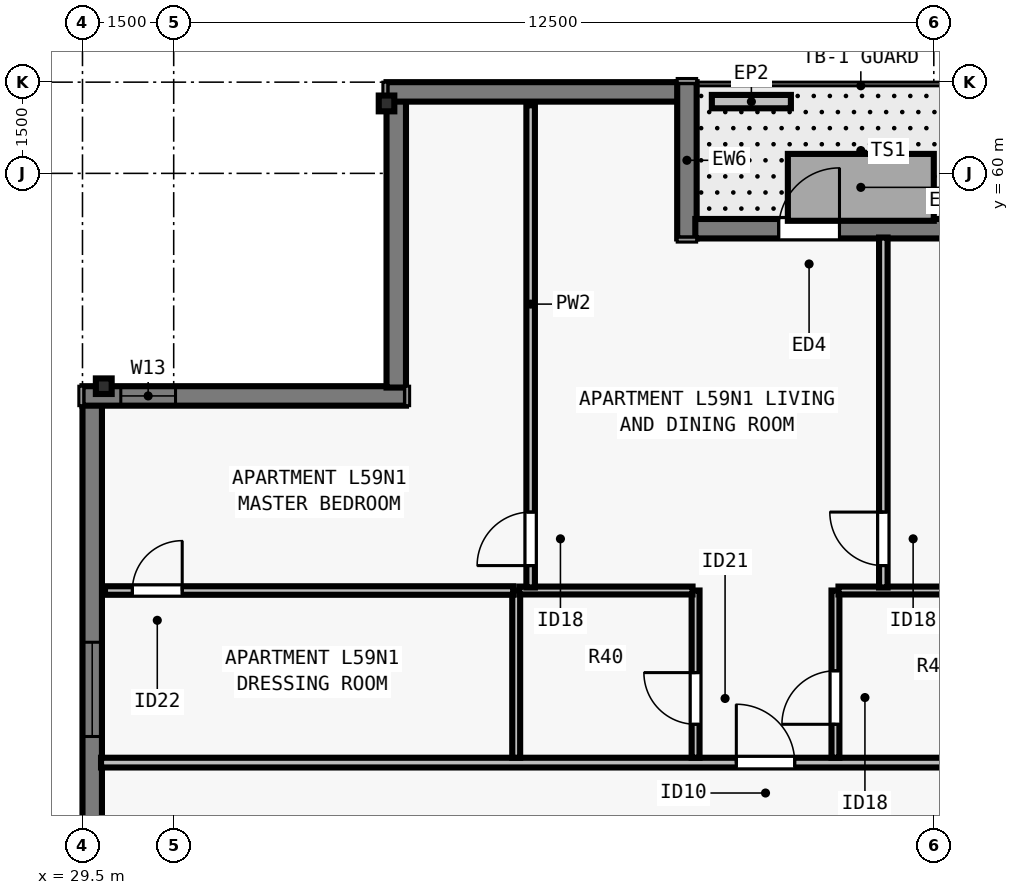
"""IFC4 building model, lengths in metres.
Left out: names, types, materials, properties, quantities, classifications, styles, units other than length and angle.
Written with IfcOpenShell. Run it as: python <this file> out.ifc"""

import sys

from ifc_helpers import new_model, si_unit, direction, frame, frame_2d, origin, origin_2d, place, context, subcontext, project, spatial, rectangle, i_section, extrude, element, fill, save


model = new_model("IFC4")
c1 = context("Model", 3, precision=1e-05, world=origin(), true_north=direction((0.0, 1.0)))
c2 = subcontext(c1, "Body", "Model", "MODEL_VIEW")
j1 = project(units=[si_unit("LENGTHUNIT", "METRE"), si_unit("PLANEANGLEUNIT", "RADIAN")], contexts=[c1])
p1 = place(None, origin())
s1 = spatial("IfcSite", under=j1, at=p1, CompositionType="ELEMENT")
p2 = place(p1, origin())
s2 = spatial("IfcBuilding", under=s1, at=p2, CompositionType="ELEMENT")
p3 = place(p2, frame((0.0, 0.0, 216.5)))
s3 = spatial("IfcBuildingStorey", under=s2, at=p3, CompositionType="ELEMENT", Elevation=216.5)
for number, where, z_axis, x_axis in (
    (1, (34.5, 61.15, 0.0), (0.0, 0.0, 1.0), (1.0, 0.0, 0.0)),
    (2, (29.85, 56.5, 0.0), (0.0, 0.0, 1.0), (0.0, 1.0, 0.0)),
):
    element("IfcColumn", number, at=place(p3, frame(where, z_axis=z_axis, x_axis=x_axis)), inside=s3, PredefinedType="COLUMN", context=c2, shape_type="SweptSolid", body=[
        extrude(i_section(OverallWidth=0.256, OverallDepth=0.26, WebThickness=0.01, FlangeThickness=0.017, FilletRadius=0.013, at=origin_2d()), origin(), (0.0, 0.0, 1.0), 3.5),
    ])
p4 = place(p3, frame((29.66, 21.5, 0.0), z_axis=(0.0, 0.0, 1.0), x_axis=(0.0, 1.0, 0.0)))
e3 = element("IfcWall", 3, at=p4, inside=s3, PredefinedType="SOLIDWALL", context=c2, shape_type="SweptSolid", body=[
    extrude(rectangle(XDim=34.702, YDim=0.32, at=frame_2d((17.351, 0.0))), origin(), (0.0, 0.0, 1.0), 3.29),
])
p5 = place(p4, frame((6.888, 0.0, 0.8)))
e4 = element("IfcOpeningElement", 4, at=p5, cuts=e3, PredefinedType="OPENING", context=c2, shape_type="SweptSolid", body=[
    extrude(rectangle(XDim=1.55, YDim=1.678, at=frame_2d((0.775, 0.839))), frame((0.0, 0.17, 0.0), z_axis=(0.0, -1.0, 0.0), x_axis=(1.0, 0.0, 0.0)), (0.0, 0.0, 1.0), 0.34),
])
p6 = place(p4, frame((10.113, 0.0, 0.8)))
e5 = element("IfcOpeningElement", 5, at=p6, cuts=e3, PredefinedType="OPENING", context=c2, shape_type="SweptSolid", body=[
    extrude(rectangle(XDim=1.85, YDim=1.678, at=frame_2d((0.925, 0.839))), frame((0.0, 0.17, 0.0), z_axis=(0.0, -1.0, 0.0), x_axis=(1.0, 0.0, 0.0)), (0.0, 0.0, 1.0), 0.34),
])
p7 = place(p4, frame((14.888, 0.0, 0.8)))
e6 = element("IfcOpeningElement", 6, at=p7, cuts=e3, PredefinedType="OPENING", context=c2, shape_type="SweptSolid", body=[
    extrude(rectangle(XDim=1.55, YDim=1.678, at=frame_2d((0.775, 0.839))), frame((0.0, 0.17, 0.0), z_axis=(0.0, -1.0, 0.0), x_axis=(1.0, 0.0, 0.0)), (0.0, 0.0, 1.0), 0.34),
])
p8 = place(p4, frame((18.114, 0.0, 0.8)))
e7 = element("IfcOpeningElement", 7, at=p8, cuts=e3, PredefinedType="OPENING", context=c2, shape_type="SweptSolid", body=[
    extrude(rectangle(XDim=1.85, YDim=1.678, at=frame_2d((0.925, 0.839))), frame((0.0, 0.17, 0.0), z_axis=(0.0, -1.0, 0.0), x_axis=(1.0, 0.0, 0.0)), (0.0, 0.0, 1.0), 0.34),
])
p9 = place(p4, frame((23.614, 0.0, 0.8)))
e8 = element("IfcOpeningElement", 8, at=p9, cuts=e3, PredefinedType="OPENING", context=c2, shape_type="SweptSolid", body=[
    extrude(rectangle(XDim=1.85, YDim=1.678, at=frame_2d((0.925, 0.839))), frame((0.0, 0.17, 0.0), z_axis=(0.0, -1.0, 0.0), x_axis=(1.0, 0.0, 0.0)), (0.0, 0.0, 1.0), 0.34),
])
p10 = place(p4, frame((29.24, 0.0, 0.8)))
e9 = element("IfcOpeningElement", 9, at=p10, cuts=e3, PredefinedType="OPENING", context=c2, shape_type="SweptSolid", body=[
    extrude(rectangle(XDim=1.55, YDim=1.678, at=frame_2d((0.775, 0.839))), frame((0.0, 0.17, 0.0), z_axis=(0.0, -1.0, 0.0), x_axis=(1.0, 0.0, 0.0)), (0.0, 0.0, 1.0), 0.34),
])
p11 = place(p3, frame((29.5, 56.34, 0.0), z_axis=(0.0, 0.0, 1.0), x_axis=(1.0, 0.0, 0.0)))
e10 = element("IfcWall", 10, at=p11, inside=s3, PredefinedType="SOLIDWALL", context=c2, shape_type="SweptSolid", body=[
    extrude(rectangle(XDim=5.32, YDim=0.32, at=frame_2d((2.66, 0.0))), origin(), (0.0, 0.0, 1.0), 3.29),
])
p12 = place(p11, frame((0.63, 0.0, 0.8)))
e11 = element("IfcOpeningElement", 11, at=p12, cuts=e10, PredefinedType="OPENING", context=c2, shape_type="SweptSolid", body=[
    extrude(rectangle(XDim=0.9, YDim=1.678, at=frame_2d((0.45, 0.839))), frame((0.0, 0.17, 0.0), z_axis=(0.0, -1.0, 0.0), x_axis=(1.0, 0.0, 0.0)), (0.0, 0.0, 1.0), 0.34),
])
p13 = place(p3, frame((34.66, 56.478, 0.0), z_axis=(0.0, 0.0, 1.0), x_axis=(0.0, 1.0, 0.0)))
e12 = element("IfcWall", 12, at=p13, inside=s3, PredefinedType="SOLIDWALL", context=c2, shape_type="SweptSolid", body=[
    extrude(rectangle(XDim=4.724, YDim=0.32, at=frame_2d((2.362, 0.0))), origin(), (0.0, 0.0, 1.0), 3.29),
])
p14 = place(p3, frame((34.5, 61.34, 0.0), z_axis=(0.0, 0.0, 1.0), x_axis=(1.0, 0.0, 0.0)))
e13 = element("IfcWall", 13, at=p14, inside=s3, PredefinedType="SOLIDWALL", context=c2, shape_type="SweptSolid", body=[
    extrude(rectangle(XDim=4.802, YDim=0.32, at=frame_2d((2.401, 0.0))), origin(), (0.0, 0.0, 1.0), 3.29),
])
p15 = place(p3, frame((39.44, 61.5, 0.0), z_axis=(0.0, 0.0, 1.0), x_axis=(0.0, -1.0, 0.0)))
e14 = element("IfcWall", 14, at=p15, inside=s3, PredefinedType="SOLIDWALL", context=c2, shape_type="SweptSolid", body=[
    extrude(rectangle(XDim=2.57, YDim=0.32, at=frame_2d((1.285, 0.0))), origin(), (0.0, 0.0, 1.0), 3.29),
])
p16 = place(p3, frame((39.578, 59.09, 0.0), z_axis=(0.0, 0.0, 1.0), x_axis=(1.0, 0.0, 0.0)))
e15 = element("IfcWall", 15, at=p16, inside=s3, PredefinedType="SOLIDWALL", context=c2, shape_type="SweptSolid", body=[
    extrude(rectangle(XDim=5.742, YDim=0.32, at=frame_2d((2.871, 0.0))), origin(), (0.0, 0.0, 1.0), 3.29),
])
p17 = place(p16, frame((1.371, 0.0, 0.0)))
e16 = element("IfcOpeningElement", 16, at=p17, cuts=e15, PredefinedType="OPENING", context=c2, shape_type="SweptSolid", body=[
    extrude(rectangle(XDim=1.0, YDim=2.15, at=frame_2d((0.5, 1.075))), frame((0.0, 0.17, 0.0), z_axis=(0.0, -1.0, 0.0), x_axis=(1.0, 0.0, 0.0)), (0.0, 0.0, 1.0), 0.34),
])
p18 = place(p3, frame((39.85, 61.18, 0.0), z_axis=(0.0, 0.0, 1.0), x_axis=(1.0, 0.0, 0.0)))
e17 = element("IfcWall", 17, at=p18, inside=s3, PredefinedType="PARAPET", context=c2, shape_type="SweptSolid", body=[
    extrude(rectangle(XDim=1.3, YDim=0.22, at=frame_2d((0.65, 0.0))), origin(), (0.0, 0.0, 1.0), 0.55),
])
p19 = place(p3, frame((29.805, 50.31, 0.0), z_axis=(0.0, 0.0, 1.0), x_axis=(1.0, 0.0, 0.0)))
e18 = element("IfcWall", 18, at=p19, inside=s3, PredefinedType="PARTITIONING", context=c2, shape_type="SweptSolid", body=[
    extrude(rectangle(XDim=44.39, YDim=0.16, at=frame_2d((22.195, 0.0))), origin(), (0.0, 0.0, 1.0), 2.958),
])
p20 = place(p19, frame((10.448, 0.0, 0.0)))
e19 = element("IfcOpeningElement", 19, at=p20, cuts=e18, PredefinedType="OPENING", context=c2, shape_type="SweptSolid", body=[
    extrude(rectangle(XDim=0.96, YDim=2.18, at=frame_2d((0.48, 1.09))), frame((0.0, 0.09, 0.0), z_axis=(0.0, -1.0, 0.0), x_axis=(1.0, 0.0, 0.0)), (0.0, 0.0, 1.0), 0.18),
])
p21 = place(p19, frame((32.528, 0.0, 0.0)))
e20 = element("IfcOpeningElement", 20, at=p21, cuts=e18, PredefinedType="OPENING", context=c2, shape_type="SweptSolid", body=[
    extrude(rectangle(XDim=0.96, YDim=2.18, at=frame_2d((0.48, 1.09))), frame((0.0, 0.09, 0.0), z_axis=(0.0, -1.0, 0.0), x_axis=(1.0, 0.0, 0.0)), (0.0, 0.0, 1.0), 0.18),
])
p22 = place(p3, frame((36.633, 50.39, 0.0), z_axis=(0.0, 0.0, 1.0), x_axis=(0.0, 1.0, 0.0)))
e21 = element("IfcWall", 21, at=p22, inside=s3, PredefinedType="PLUMBINGWALL", context=c2, shape_type="SweptSolid", body=[
    extrude(rectangle(XDim=2.75, YDim=0.13, at=frame_2d((1.375, 0.0))), origin(), (0.0, 0.0, 1.0), 3.29),
])
p23 = place(p3, frame((39.583, 50.39, 0.0), z_axis=(0.0, 0.0, 1.0), x_axis=(0.0, 1.0, 0.0)))
e22 = element("IfcWall", 22, at=p23, inside=s3, PredefinedType="PLUMBINGWALL", context=c2, shape_type="SweptSolid", body=[
    extrude(rectangle(XDim=2.75, YDim=0.13, at=frame_2d((1.375, 0.0))), origin(), (0.0, 0.0, 1.0), 3.29),
])
p24 = place(p23, frame((0.55, 0.0, 0.0)))
e23 = element("IfcOpeningElement", 23, at=p24, cuts=e22, PredefinedType="OPENING", context=c2, shape_type="SweptSolid", body=[
    extrude(rectangle(XDim=0.85, YDim=2.08, at=frame_2d((0.425, 1.04))), frame((0.0, 0.075, 0.0), z_axis=(0.0, -1.0, 0.0), x_axis=(1.0, 0.0, 0.0)), (0.0, 0.0, 1.0), 0.15),
])
p25 = place(p3, frame((36.683, 53.14, 0.0), z_axis=(0.0, 0.0, 1.0), x_axis=(1.0, 0.0, 0.0)))
e24 = element("IfcWall", 24, at=p25, inside=s3, PredefinedType="PLUMBINGWALL", context=c2, shape_type="SweptSolid", body=[
    extrude(rectangle(XDim=2.85, YDim=0.13, at=frame_2d((1.425, 0.0))), origin(), (0.0, 0.0, 1.0), 3.29),
])
p26 = place(p3, frame((41.883, 50.39, 0.0), z_axis=(0.0, 0.0, 1.0), x_axis=(0.0, 1.0, 0.0)))
e25 = element("IfcWall", 25, at=p26, inside=s3, PredefinedType="PLUMBINGWALL", context=c2, shape_type="SweptSolid", body=[
    extrude(rectangle(XDim=2.75, YDim=0.13, at=frame_2d((1.375, 0.0))), origin(), (0.0, 0.0, 1.0), 3.29),
])
p27 = place(p26, frame((0.55, 0.0, 0.0)))
e26 = element("IfcOpeningElement", 26, at=p27, cuts=e25, PredefinedType="OPENING", context=c2, shape_type="SweptSolid", body=[
    extrude(rectangle(XDim=0.88, YDim=2.1, at=frame_2d((0.44, 1.05))), frame((0.0, 0.075, 0.0), z_axis=(0.0, -1.0, 0.0), x_axis=(1.0, 0.0, 0.0)), (0.0, 0.0, 1.0), 0.15),
])
p28 = place(p3, frame((41.933, 53.14, 0.0), z_axis=(0.0, 0.0, 1.0), x_axis=(1.0, 0.0, 0.0)))
e27 = element("IfcWall", 27, at=p28, inside=s3, PredefinedType="PLUMBINGWALL", context=c2, shape_type="SweptSolid", body=[
    extrude(rectangle(XDim=3.15, YDim=0.13, at=frame_2d((1.575, 0.0))), origin(), (0.0, 0.0, 1.0), 3.29),
])
p29 = place(p3, frame((36.87, 53.19, 0.0), z_axis=(0.0, 0.0, 1.0), x_axis=(0.0, 1.0, 0.0)))
e28 = element("IfcWall", 28, at=p29, inside=s3, PredefinedType="PARTITIONING", context=c2, shape_type="SweptSolid", body=[
    extrude(rectangle(XDim=7.93, YDim=0.14, at=frame_2d((3.965, 0.0))), origin(), (0.0, 0.0, 1.0), 2.573),
])
p30 = place(p29, frame((0.36, 0.0, 0.0)))
e29 = element("IfcOpeningElement", 29, at=p30, cuts=e28, PredefinedType="OPENING", context=c2, shape_type="SweptSolid", body=[
    extrude(rectangle(XDim=0.88, YDim=2.1, at=frame_2d((0.44, 1.05))), frame((0.0, 0.08, 0.0), z_axis=(0.0, -1.0, 0.0), x_axis=(1.0, 0.0, 0.0)), (0.0, 0.0, 1.0), 0.16),
])
p31 = place(p3, frame((29.87, 53.14, 0.0), z_axis=(0.0, 0.0, 1.0), x_axis=(1.0, 0.0, 0.0)))
e30 = element("IfcWall", 30, at=p31, inside=s3, PredefinedType="PARTITIONING", context=c2, shape_type="SweptSolid", body=[
    extrude(rectangle(XDim=6.712, YDim=0.14, at=frame_2d((3.356, 0.0))), origin(), (0.0, 0.0, 1.0), 2.958),
])
p32 = place(p31, frame((0.45, 0.0, 0.0)))
e31 = element("IfcOpeningElement", 31, at=p32, cuts=e30, PredefinedType="OPENING", context=c2, shape_type="SweptSolid", body=[
    extrude(rectangle(XDim=0.82, YDim=2.1, at=frame_2d((0.41, 1.05))), frame((0.0, 0.08, 0.0), z_axis=(0.0, -1.0, 0.0), x_axis=(1.0, 0.0, 0.0)), (0.0, 0.0, 1.0), 0.16),
])
p33 = place(p3, frame((42.67, 53.19, 0.0), z_axis=(0.0, 0.0, 1.0), x_axis=(0.0, 1.0, 0.0)))
e32 = element("IfcWall", 32, at=p33, inside=s3, PredefinedType="PARTITIONING", context=c2, shape_type="SweptSolid", body=[
    extrude(rectangle(XDim=5.755, YDim=0.14, at=frame_2d((2.877, 0.0))), origin(), (0.0, 0.0, 1.0), 3.29),
])
p34 = place(p33, frame((0.36, 0.0, 0.0)))
e33 = element("IfcOpeningElement", 33, at=p34, cuts=e32, PredefinedType="OPENING", context=c2, shape_type="SweptSolid", body=[
    extrude(rectangle(XDim=0.88, YDim=2.1, at=frame_2d((0.44, 1.05))), frame((0.0, 0.08, 0.0), z_axis=(0.0, -1.0, 0.0), x_axis=(1.0, 0.0, 0.0)), (0.0, 0.0, 1.0), 0.16),
])
p35 = place(p10, origin())
e34 = element("IfcWindow", 34, at=p35, inside=s3, PartitioningType="SINGLE_PANEL", PredefinedType="WINDOW", context=c2, shape_type="SweptSolid", body=[
    extrude(rectangle(XDim=1.55, YDim=1.678, at=frame_2d((0.775, 0.839))), frame((0.0, -0.05, 0.0), z_axis=(0.0, -1.0, 0.0), x_axis=(1.0, 0.0, 0.0)), (0.0, 0.0, 1.0), 0.06),
])
fill(e9, e34)
p36 = place(p17, origin())
e35 = element("IfcDoor", 35, at=p36, inside=s3, OperationType="SINGLE_SWING_RIGHT", PredefinedType="DOOR", context=c2, shape_type="SweptSolid", body=[
    extrude(rectangle(XDim=1.0, YDim=2.15, at=frame_2d((0.5, 1.075))), frame((0.0, 0.025, 0.0), z_axis=(0.0, -1.0, 0.0), x_axis=(1.0, 0.0, 0.0)), (0.0, 0.0, 1.0), 0.05),
])
fill(e16, e35)
p37 = place(p12, origin())
e36 = element("IfcWindow", 36, at=p37, inside=s3, PartitioningType="SINGLE_PANEL", PredefinedType="WINDOW", context=c2, shape_type="SweptSolid", body=[
    extrude(rectangle(XDim=0.9, YDim=1.678, at=frame_2d((0.45, 0.839))), frame((0.0, -0.04, 0.0), z_axis=(0.0, -1.0, 0.0), x_axis=(1.0, 0.0, 0.0)), (0.0, 0.0, 1.0), 0.06),
])
fill(e11, e36)
p38 = place(p24, origin())
e37 = element("IfcDoor", 37, at=p38, inside=s3, OperationType="SINGLE_SWING_RIGHT", PredefinedType="DOOR", context=c2, shape_type="SweptSolid", body=[
    extrude(rectangle(XDim=0.85, YDim=2.08, at=frame_2d((0.425, 1.04))), frame((0.0, 0.025, 0.0), z_axis=(0.0, -1.0, 0.0), x_axis=(1.0, 0.0, 0.0)), (0.0, 0.0, 1.0), 0.05),
])
fill(e23, e37)
p39 = place(p27, origin())
e38 = element("IfcDoor", 38, at=p39, inside=s3, OperationType="SINGLE_SWING_LEFT", PredefinedType="DOOR", context=c2, shape_type="SweptSolid", body=[
    extrude(rectangle(XDim=0.88, YDim=2.1, at=frame_2d((0.44, 1.05))), frame((0.0, 0.025, 0.0), z_axis=(0.0, -1.0, 0.0), x_axis=(1.0, 0.0, 0.0)), (0.0, 0.0, 1.0), 0.05),
])
fill(e26, e38)
p40 = place(p32, origin())
e39 = element("IfcDoor", 39, at=p40, inside=s3, OperationType="SINGLE_SWING_RIGHT", PredefinedType="DOOR", context=c2, shape_type="SweptSolid", body=[
    extrude(rectangle(XDim=0.82, YDim=2.1, at=frame_2d((0.41, 1.05))), frame((0.0, 0.025, 0.0), z_axis=(0.0, -1.0, 0.0), x_axis=(1.0, 0.0, 0.0)), (0.0, 0.0, 1.0), 0.05),
])
fill(e31, e39)
p41 = place(p30, origin())
e40 = element("IfcDoor", 40, at=p41, inside=s3, OperationType="SINGLE_SWING_LEFT", PredefinedType="DOOR", context=c2, shape_type="SweptSolid", body=[
    extrude(rectangle(XDim=0.88, YDim=2.1, at=frame_2d((0.44, 1.05))), frame((0.0, 0.025, 0.0), z_axis=(0.0, -1.0, 0.0), x_axis=(1.0, 0.0, 0.0)), (0.0, 0.0, 1.0), 0.05),
])
fill(e29, e40)
p42 = place(p34, origin())
e41 = element("IfcDoor", 41, at=p42, inside=s3, OperationType="SINGLE_SWING_RIGHT", PredefinedType="DOOR", context=c2, shape_type="SweptSolid", body=[
    extrude(rectangle(XDim=0.88, YDim=2.1, at=frame_2d((0.44, 1.05))), frame((0.0, 0.025, 0.0), z_axis=(0.0, -1.0, 0.0), x_axis=(1.0, 0.0, 0.0)), (0.0, 0.0, 1.0), 0.05),
])
fill(e33, e41)
p43 = place(p20, origin())
e42 = element("IfcDoor", 42, at=p43, inside=s3, OperationType="SINGLE_SWING_LEFT", PredefinedType="DOOR", context=c2, shape_type="SweptSolid", body=[
    extrude(rectangle(XDim=0.96, YDim=2.18, at=frame_2d((0.48, 1.09))), frame((0.0, 0.025, 0.0), z_axis=(0.0, -1.0, 0.0), x_axis=(1.0, 0.0, 0.0)), (0.0, 0.0, 1.0), 0.05),
])
fill(e19, e42)
save(model, sys.argv[1])
